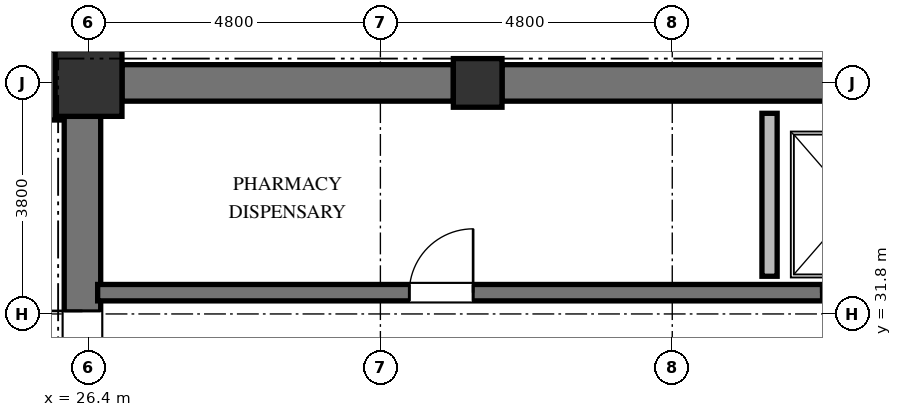
"""IFC4 building model, lengths in metres.
Left out: names, types, materials, properties, quantities, classifications, styles, units other than length and angle.
Written with IfcOpenShell. Run it as: python <this file> out.ifc"""

import sys

from ifc_helpers import new_model, si_unit, direction, frame, frame_2d, origin, origin_2d, place, context, subcontext, project, spatial, rectangle, extrude, element, fill, save


model = new_model("IFC4")
c1 = context("Model", 3, precision=1e-05, world=origin(), true_north=direction((0.0, 1.0)))
c2 = subcontext(c1, "Body", "Model", "MODEL_VIEW")
j1 = project(units=[si_unit("LENGTHUNIT", "METRE"), si_unit("PLANEANGLEUNIT", "RADIAN")], contexts=[c1])
p1 = place(None, origin())
s1 = spatial("IfcSite", under=j1, at=p1, CompositionType="ELEMENT")
p2 = place(p1, origin())
s2 = spatial("IfcBuilding", under=s1, at=p2, CompositionType="ELEMENT")
p3 = place(p2, frame((0.0, 0.0, 198.48)))
s3 = spatial("IfcBuildingStorey", under=s2, at=p3, CompositionType="ELEMENT", Elevation=198.48)
p4 = place(p3, frame((32.8, 35.6, 0.0), z_axis=(0.0, 0.0, 1.0), x_axis=(1.0, 0.0, 0.0)))
e1 = element("IfcColumn", 1, at=p4, inside=s3, PredefinedType="COLUMN", context=c2, shape_type="SweptSolid", body=[
    extrude(rectangle(XDim=0.8, YDim=0.8, at=origin_2d()), origin(), (0.0, 0.0, 1.0), 3.648),
])
p5 = place(p3, frame((26.4, 35.6, 0.0), z_axis=(0.0, 0.0, 1.0), x_axis=(1.0, 0.0, 0.0)))
e2 = element("IfcColumn", 2, at=p5, inside=s3, PredefinedType="COLUMN", context=c2, shape_type="SweptSolid", body=[
    extrude(rectangle(XDim=1.1, YDim=1.1, at=origin_2d()), origin(), (0.0, 0.0, 1.0), 3.648),
])
p6 = place(p3, frame((26.3, 20.95, 0.0), z_axis=(0.0, 0.0, 1.0), x_axis=(0.0, 1.0, 0.0)))
e3 = element("IfcWall", 3, at=p6, inside=s3, PredefinedType="SHEAR", context=c2, shape_type="SweptSolid", body=[
    extrude(rectangle(XDim=14.1, YDim=0.6, at=frame_2d((7.05, 0.0))), origin(), (0.0, 0.0, 1.0), 3.648),
])
p7 = place(p6, frame((6.5, 0.0, 0.0)))
e4 = element("IfcOpeningElement", 4, at=p7, cuts=e3, PredefinedType="OPENING", context=c2, shape_type="SweptSolid", body=[
    extrude(rectangle(XDim=1.2, YDim=2.15, at=frame_2d((0.6, 1.075))), frame((0.0, 0.31, 0.0), z_axis=(0.0, -1.0, 0.0), x_axis=(1.0, 0.0, 0.0)), (0.0, 0.0, 1.0), 0.62),
])
p8 = place(p6, frame((9.6, 0.0, 0.0)))
e5 = element("IfcOpeningElement", 5, at=p8, cuts=e3, PredefinedType="OPENING", context=c2, shape_type="SweptSolid", body=[
    extrude(rectangle(XDim=1.3, YDim=2.2, at=frame_2d((0.65, 1.1))), frame((0.0, 0.31, 0.0), z_axis=(0.0, -1.0, 0.0), x_axis=(1.0, 0.0, 0.0)), (0.0, 0.0, 1.0), 0.62),
])
p9 = place(p6, frame((3.26, 0.0, 0.0)))
e6 = element("IfcOpeningElement", 6, at=p9, cuts=e3, PredefinedType="OPENING", context=c2, shape_type="SweptSolid", body=[
    extrude(rectangle(XDim=1.3, YDim=2.2, at=frame_2d((0.65, 1.1))), frame((0.0, 0.31, 0.0), z_axis=(0.0, -1.0, 0.0), x_axis=(1.0, 0.0, 0.0)), (0.0, 0.0, 1.0), 0.62),
])
p10 = place(p3, frame((26.95, 35.6, 0.0), z_axis=(0.0, 0.0, 1.0), x_axis=(1.0, 0.0, 0.0)))
e7 = element("IfcWall", 7, at=p10, inside=s3, PredefinedType="SHEAR", context=c2, shape_type="SweptSolid", body=[
    extrude(rectangle(XDim=5.45, YDim=0.6, at=frame_2d((2.725, 0.0))), origin(), (0.0, 0.0, 1.0), 3.648),
])
p11 = place(p3, frame((33.2, 35.6, 0.0), z_axis=(0.0, 0.0, 1.0), x_axis=(1.0, 0.0, 0.0)))
e8 = element("IfcWall", 8, at=p11, inside=s3, PredefinedType="SHEAR", context=c2, shape_type="SweptSolid", body=[
    extrude(rectangle(XDim=5.6, YDim=0.6, at=frame_2d((2.8, 0.0))), origin(), (0.0, 0.0, 1.0), 3.648),
])
p12 = place(p3, frame((26.55, 32.15, 0.0), z_axis=(0.0, 0.0, 1.0), x_axis=(1.0, 0.0, 0.0)))
e9 = element("IfcWall", 9, at=p12, inside=s3, PredefinedType="SHEAR", context=c2, shape_type="SweptSolid", body=[
    extrude(rectangle(XDim=16.4, YDim=0.27, at=frame_2d((8.2, 0.0))), origin(), (0.0, 0.0, 1.0), 3.648),
])
p13 = place(p12, frame((5.125, 0.0, 0.0)))
e10 = element("IfcOpeningElement", 10, at=p13, cuts=e9, PredefinedType="OPENING", context=c2, shape_type="SweptSolid", body=[
    extrude(rectangle(XDim=1.05, YDim=2.15, at=frame_2d((0.525, 1.075))), frame((0.0, 0.145, 0.0), z_axis=(0.0, -1.0, 0.0), x_axis=(1.0, 0.0, 0.0)), (0.0, 0.0, 1.0), 0.29),
])
p14 = place(p12, frame((11.9, 0.0, 0.0)))
e11 = element("IfcOpeningElement", 11, at=p14, cuts=e9, PredefinedType="OPENING", context=c2, shape_type="SweptSolid", body=[
    extrude(rectangle(XDim=1.1, YDim=2.2, at=frame_2d((0.55, 1.1))), frame((0.0, 0.145, 0.0), z_axis=(0.0, -1.0, 0.0), x_axis=(1.0, 0.0, 0.0)), (0.0, 0.0, 1.0), 0.29),
])
p15 = place(p12, frame((14.5, 0.0, 0.0)))
e12 = element("IfcOpeningElement", 12, at=p15, cuts=e9, PredefinedType="OPENING", context=c2, shape_type="SweptSolid", body=[
    extrude(rectangle(XDim=1.1, YDim=2.2, at=frame_2d((0.55, 1.1))), frame((0.0, 0.145, 0.0), z_axis=(0.0, -1.0, 0.0), x_axis=(1.0, 0.0, 0.0)), (0.0, 0.0, 1.0), 0.29),
])
p16 = place(p3, frame((37.6, 32.42, 0.0), z_axis=(0.0, 0.0, 1.0), x_axis=(0.0, 1.0, 0.0)))
e13 = element("IfcWall", 13, at=p16, inside=s3, PredefinedType="SOLIDWALL", context=c2, shape_type="SweptSolid", body=[
    extrude(rectangle(XDim=2.68, YDim=0.25, at=frame_2d((1.34, 0.0))), origin(), (0.0, 0.0, 1.0), 3.448),
])
p17 = place(p3, frame((25.83, 36.14, 0.0), z_axis=(0.0, 0.0, 1.0), x_axis=(0.0, -1.0, 0.0)))
e14 = element("IfcWall", 14, at=p17, inside=s3, PredefinedType="PARTITIONING", context=c2, shape_type="SweptSolid", body=[
    extrude(rectangle(XDim=1.15, YDim=0.18, at=frame_2d((0.575, 0.0))), origin(), (0.0, 0.0, 1.0), 3.448),
])
p18 = place(p8, origin())
e15 = element("IfcDoor", 15, at=p18, inside=s3, OperationType="SINGLE_SWING_RIGHT", PredefinedType="DOOR", context=c2, shape_type="SweptSolid", body=[
    extrude(rectangle(XDim=1.3, YDim=2.2, at=frame_2d((0.65, 1.1))), frame((0.0, 0.025, 0.0), z_axis=(0.0, -1.0, 0.0), x_axis=(1.0, 0.0, 0.0)), (0.0, 0.0, 1.0), 0.05),
])
fill(e5, e15)
p19 = place(p13, origin())
e16 = element("IfcDoor", 16, at=p19, inside=s3, OperationType="SINGLE_SWING_RIGHT", PredefinedType="DOOR", context=c2, shape_type="SweptSolid", body=[
    extrude(rectangle(XDim=1.05, YDim=2.15, at=frame_2d((0.525, 1.075))), frame((0.0, 0.025, 0.0), z_axis=(0.0, -1.0, 0.0), x_axis=(1.0, 0.0, 0.0)), (0.0, 0.0, 1.0), 0.05),
])
fill(e10, e16)
p20 = place(p14, origin())
e17 = element("IfcDoor", 17, at=p20, inside=s3, OperationType="SLIDING_TO_LEFT", PredefinedType="DOOR", context=c2, shape_type="SweptSolid", body=[
    extrude(rectangle(XDim=1.1, YDim=2.2, at=frame_2d((0.55, 1.1))), frame((0.0, 0.025, 0.0), z_axis=(0.0, -1.0, 0.0), x_axis=(1.0, 0.0, 0.0)), (0.0, 0.0, 1.0), 0.05),
])
fill(e11, e17)
save(model, sys.argv[1])
